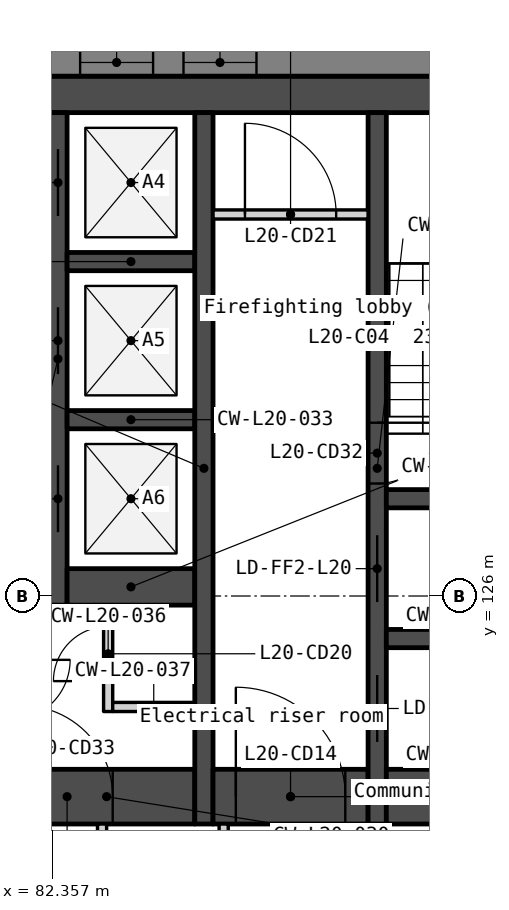
"""IFC4 building model, lengths in metres.
Left out: names, types, materials, properties, quantities, classifications, styles, units other than length and angle.
Written with IfcOpenShell. Run it as: python <this file> out.ifc"""

import sys

from ifc_helpers import new_model, si_unit, direction, frame, frame_2d, origin, place, context, subcontext, project, spatial, polyline, rectangle, outline, extrude, element, fill, save


model = new_model("IFC4")
c1 = context("Model", 3, precision=1e-05, world=origin(), true_north=direction((0.0, 1.0)))
c2 = subcontext(c1, "Body", "Model", "MODEL_VIEW")
j1 = project(units=[si_unit("LENGTHUNIT", "METRE"), si_unit("PLANEANGLEUNIT", "RADIAN")], contexts=[c1])
p1 = place(None, origin())
s1 = spatial("IfcSite", under=j1, at=p1, CompositionType="ELEMENT")
p2 = place(p1, origin())
s2 = spatial("IfcBuilding", under=s1, at=p2, CompositionType="ELEMENT")
p3 = place(p2, frame((0.0, 0.0, 85.3)))
s3 = spatial("IfcBuildingStorey", under=s2, at=p3, CompositionType="ELEMENT", Elevation=85.3)
p4 = place(p3, frame((66.0, 134.25, 0.0), z_axis=(0.0, 0.0, 1.0), x_axis=(1.0, 0.0, 0.0)))
e1 = element("IfcWall", 1, at=p4, inside=s3, PredefinedType="SOLIDWALL", context=c2, shape_type="SweptSolid", body=[
    extrude(rectangle(XDim=28.0, YDim=0.6, at=frame_2d((14.0, 0.0))), origin(), (0.0, 0.0, 1.0), 3.35),
])
p5 = place(p3, frame((81.8, 122.7, 0.0), z_axis=(0.0, 0.0, 1.0), x_axis=(1.0, 0.0, 0.0)))
e2 = element("IfcWall", 2, at=p5, inside=s3, PredefinedType="SOLIDWALL", context=c2, shape_type="SweptSolid", body=[
    extrude(rectangle(XDim=2.9, YDim=0.9, at=frame_2d((1.45, 0.0))), origin(), (0.0, 0.0, 1.0), 3.35),
])
p6 = place(p5, frame((0.05, 0.0, 0.0)))
e3 = element("IfcOpeningElement", 3, at=p6, cuts=e2, PredefinedType="OPENING", context=c2, shape_type="SweptSolid", body=[
    extrude(rectangle(XDim=1.5, YDim=2.1, at=frame_2d((0.75, 1.05))), frame((0.0, 0.46, 0.0), z_axis=(0.0, -1.0, 0.0), x_axis=(1.0, 0.0, 0.0)), (0.0, 0.0, 1.0), 0.92),
])
p7 = place(p3, frame((82.45, 133.95, 0.0), z_axis=(0.0, 0.0, 1.0), x_axis=(0.0, -1.0, 0.0)))
e4 = element("IfcWall", 4, at=p7, inside=s3, PredefinedType="SOLIDWALL", context=c2, shape_type="SweptSolid", body=[
    extrude(rectangle(XDim=8.1, YDim=0.3, at=frame_2d((4.05, 0.0))), origin(), (0.0, 0.0, 1.0), 3.35),
])
p8 = place(p7, frame((0.6, 0.0, 0.0)))
e5 = element("IfcOpeningElement", 5, at=p8, cuts=e4, PredefinedType="OPENING", context=c2, shape_type="SweptSolid", body=[
    extrude(rectangle(XDim=1.1, YDim=2.1, at=frame_2d((0.55, 1.05))), frame((0.0, 0.16, 0.0), z_axis=(0.0, -1.0, 0.0), x_axis=(1.0, 0.0, 0.0)), (0.0, 0.0, 1.0), 0.32),
])
p9 = place(p7, frame((3.2, 0.0, 0.0)))
e6 = element("IfcOpeningElement", 6, at=p9, cuts=e4, PredefinedType="OPENING", context=c2, shape_type="SweptSolid", body=[
    extrude(rectangle(XDim=1.1, YDim=2.1, at=frame_2d((0.55, 1.05))), frame((0.0, 0.16, 0.0), z_axis=(0.0, -1.0, 0.0), x_axis=(1.0, 0.0, 0.0)), (0.0, 0.0, 1.0), 0.32),
])
p10 = place(p7, frame((5.8, 0.0, 0.0)))
e7 = element("IfcOpeningElement", 7, at=p10, cuts=e4, PredefinedType="OPENING", context=c2, shape_type="SweptSolid", body=[
    extrude(rectangle(XDim=1.1, YDim=2.1, at=frame_2d((0.55, 1.05))), frame((0.0, 0.16, 0.0), z_axis=(0.0, -1.0, 0.0), x_axis=(1.0, 0.0, 0.0)), (0.0, 0.0, 1.0), 0.32),
])
for number, where, z_axis, x_axis in (
    (8, (82.6, 131.5, 0.0), (0.0, 0.0, 1.0), (1.0, 0.0, 0.0)),
    (9, (82.6, 128.9, 0.0), (0.0, 0.0, 1.0), (1.0, 0.0, 0.0)),
):
    element("IfcWall", number, at=place(p3, frame(where, z_axis=z_axis, x_axis=x_axis)), inside=s3, PredefinedType="SOLIDWALL", context=c2, shape_type="SweptSolid", body=[
        extrude(rectangle(XDim=2.1, YDim=0.3, at=frame_2d((1.05, 0.0))), origin(), (0.0, 0.0, 1.0), 3.35),
    ])
p11 = place(p3, frame((82.6, 126.15, 0.0), z_axis=(0.0, 0.0, 1.0), x_axis=(1.0, 0.0, 0.0)))
e10 = element("IfcWall", 10, at=p11, inside=s3, PredefinedType="SOLIDWALL", context=c2, shape_type="SweptSolid", body=[
    extrude(rectangle(XDim=2.1, YDim=0.6, at=frame_2d((1.05, 0.0))), origin(), (0.0, 0.0, 1.0), 3.35),
])
p12 = place(p3, frame((83.175, 122.25, 0.0), z_axis=(0.0, 0.0, 1.0), x_axis=(0.0, -1.0, 0.0)))
e11 = element("IfcWall", 11, at=p12, inside=s3, PredefinedType="PARTITIONING", context=c2, shape_type="SweptSolid", body=[
    extrude(rectangle(XDim=2.1, YDim=0.15, at=frame_2d((1.05, 0.0))), origin(), (0.0, 0.0, 1.0), 3.35),
])
p13 = place(p3, frame((83.275, 125.85, 0.0), z_axis=(0.0, 0.0, 1.0), x_axis=(0.0, -1.0, 0.0)))
e12 = element("IfcWall", 12, at=p13, inside=s3, PredefinedType="PARTITIONING", context=c2, shape_type="SweptSolid", body=[
    extrude(rectangle(XDim=1.75, YDim=0.15, at=frame_2d((0.875, 0.0))), origin(), (0.0, 0.0, 1.0), 3.35),
])
p14 = place(p13, frame((0.35, 0.0, 0.0)))
e13 = element("IfcOpeningElement", 13, at=p14, cuts=e12, PredefinedType="OPENING", context=c2, shape_type="SweptSolid", body=[
    extrude(rectangle(XDim=0.9, YDim=2.1, at=frame_2d((0.45, 1.05))), frame((0.0, 0.085, 0.0), z_axis=(0.0, -1.0, 0.0), x_axis=(1.0, 0.0, 0.0)), (0.0, 0.0, 1.0), 0.17),
])
p15 = place(p3, frame((83.35, 124.175, 0.0), z_axis=(0.0, 0.0, 1.0), x_axis=(1.0, 0.0, 0.0)))
e14 = element("IfcWall", 14, at=p15, inside=s3, PredefinedType="PARTITIONING", context=c2, shape_type="SweptSolid", body=[
    extrude(rectangle(XDim=1.35, YDim=0.15, at=frame_2d((0.675, 0.0))), origin(), (0.0, 0.0, 1.0), 3.35),
])
p16 = place(p3, frame((84.85, 133.95, 0.0), z_axis=(0.0, 0.0, 1.0), x_axis=(0.0, -1.0, 0.0)))
e15 = element("IfcWall", 15, at=p16, inside=s3, PredefinedType="SOLIDWALL", context=c2, shape_type="SweptSolid", body=[
    extrude(rectangle(XDim=11.7, YDim=0.3, at=frame_2d((5.85, 0.0))), origin(), (0.0, 0.0, 1.0), 3.35),
])
p17 = place(p3, frame((85.0, 132.275, 0.0), z_axis=(0.0, 0.0, 1.0), x_axis=(1.0, 0.0, 0.0)))
e16 = element("IfcWall", 16, at=p17, inside=s3, PredefinedType="PARTITIONING", context=c2, shape_type="SweptSolid", body=[
    extrude(rectangle(XDim=2.55, YDim=0.15, at=frame_2d((1.275, 0.0))), origin(), (0.0, 0.0, 1.0), 3.35),
])
p18 = place(p17, frame((0.525, 0.0, 0.0)))
e17 = element("IfcOpeningElement", 17, at=p18, cuts=e16, PredefinedType="OPENING", context=c2, shape_type="SweptSolid", body=[
    extrude(rectangle(XDim=1.5, YDim=2.1, at=frame_2d((0.75, 1.05))), frame((0.0, 0.085, 0.0), z_axis=(0.0, -1.0, 0.0), x_axis=(1.0, 0.0, 0.0)), (0.0, 0.0, 1.0), 0.17),
])
p19 = place(p3, frame((85.0, 122.7, 0.0), z_axis=(0.0, 0.0, 1.0), x_axis=(1.0, 0.0, 0.0)))
e18 = element("IfcWall", 18, at=p19, inside=s3, PredefinedType="SOLIDWALL", context=c2, shape_type="SweptSolid", body=[
    extrude(rectangle(XDim=2.55, YDim=0.9, at=frame_2d((1.275, 0.0))), origin(), (0.0, 0.0, 1.0), 3.35),
])
p20 = place(p19, frame((0.375, 0.0, 0.0)))
e19 = element("IfcOpeningElement", 19, at=p20, cuts=e18, PredefinedType="OPENING", context=c2, shape_type="SweptSolid", body=[
    extrude(rectangle(XDim=1.8, YDim=2.1, at=frame_2d((0.9, 1.05))), frame((0.0, 0.46, 0.0), z_axis=(0.0, -1.0, 0.0), x_axis=(1.0, 0.0, 0.0)), (0.0, 0.0, 1.0), 0.92),
])
p21 = place(p3, frame((85.175, 122.25, 0.0), z_axis=(0.0, 0.0, 1.0), x_axis=(0.0, -1.0, 0.0)))
e20 = element("IfcWall", 20, at=p21, inside=s3, PredefinedType="PARTITIONING", context=c2, shape_type="SweptSolid", body=[
    extrude(rectangle(XDim=2.1, YDim=0.15, at=frame_2d((1.05, 0.0))), origin(), (0.0, 0.0, 1.0), 3.35),
])
p22 = place(p21, frame((0.55, 0.0, 0.0)))
e21 = element("IfcOpeningElement", 21, at=p22, cuts=e20, PredefinedType="OPENING", context=c2, shape_type="SweptSolid", body=[
    extrude(rectangle(XDim=1.0, YDim=2.1, at=frame_2d((0.5, 1.05))), frame((0.0, 0.085, 0.0), z_axis=(0.0, -1.0, 0.0), x_axis=(1.0, 0.0, 0.0)), (0.0, 0.0, 1.0), 0.17),
])
p23 = place(p3, frame((87.375, 122.25, 0.0), z_axis=(0.0, 0.0, 1.0), x_axis=(0.0, -1.0, 0.0)))
e22 = element("IfcWall", 22, at=p23, inside=s3, PredefinedType="PARTITIONING", context=c2, shape_type="SweptSolid", body=[
    extrude(rectangle(XDim=2.1, YDim=0.15, at=frame_2d((1.05, 0.0))), origin(), (0.0, 0.0, 1.0), 3.35),
])
p24 = place(p3, frame((87.7, 133.95, 0.0), z_axis=(0.0, 0.0, 1.0), x_axis=(0.0, -1.0, 0.0)))
e23 = element("IfcWall", 23, at=p24, inside=s3, PredefinedType="SOLIDWALL", context=c2, shape_type="SweptSolid", body=[
    extrude(rectangle(XDim=11.7, YDim=0.3, at=frame_2d((5.85, 0.0))), origin(), (0.0, 0.0, 1.0), 3.35),
])
p25 = place(p24, frame((6.95, 0.0, 0.0)))
e24 = element("IfcOpeningElement", 24, at=p25, cuts=e23, PredefinedType="OPENING", context=c2, shape_type="SweptSolid", body=[
    extrude(rectangle(XDim=1.1, YDim=2.1, at=frame_2d((0.55, 1.05))), frame((0.0, 0.16, 0.0), z_axis=(0.0, -1.0, 0.0), x_axis=(1.0, 0.0, 0.0)), (0.0, 0.0, 1.0), 0.32),
])
p26 = place(p24, frame((5.1, 0.0, 0.0)))
e25 = element("IfcOpeningElement", 25, at=p26, cuts=e23, PredefinedType="OPENING", context=c2, shape_type="SweptSolid", body=[
    extrude(rectangle(XDim=1.0, YDim=2.1, at=frame_2d((0.5, 1.05))), frame((0.0, 0.16, 0.0), z_axis=(0.0, -1.0, 0.0), x_axis=(1.0, 0.0, 0.0)), (0.0, 0.0, 1.0), 0.32),
])
p27 = place(p24, frame((9.25, 0.0, 0.0)))
e26 = element("IfcOpeningElement", 26, at=p27, cuts=e23, PredefinedType="OPENING", context=c2, shape_type="SweptSolid", body=[
    extrude(rectangle(XDim=1.1, YDim=2.1, at=frame_2d((0.55, 1.05))), frame((0.0, 0.16, 0.0), z_axis=(0.0, -1.0, 0.0), x_axis=(1.0, 0.0, 0.0)), (0.0, 0.0, 1.0), 0.32),
])
for number, where, z_axis, x_axis in (
    (27, (87.85, 127.6, 0.0), (0.0, 0.0, 1.0), (1.0, 0.0, 0.0)),
    (28, (87.85, 125.3, 0.0), (0.0, 0.0, 1.0), (1.0, 0.0, 0.0)),
):
    element("IfcWall", number, at=place(p3, frame(where, z_axis=z_axis, x_axis=x_axis)), inside=s3, PredefinedType="SOLIDWALL", context=c2, shape_type="SweptSolid", body=[
        extrude(rectangle(XDim=2.55, YDim=0.3, at=frame_2d((1.275, 0.0))), origin(), (0.0, 0.0, 1.0), 3.35),
    ])
p28 = place(p3, frame((87.85, 122.7, 0.0), z_axis=(0.0, 0.0, 1.0), x_axis=(1.0, 0.0, 0.0)))
e29 = element("IfcWall", 29, at=p28, inside=s3, PredefinedType="SOLIDWALL", context=c2, shape_type="SweptSolid", body=[
    extrude(rectangle(XDim=2.55, YDim=0.9, at=frame_2d((1.275, 0.0))), origin(), (0.0, 0.0, 1.0), 3.35),
])
p29 = place(p3, frame((101.322, 134.775, -0.15), z_axis=(0.0, 0.0, 1.0), x_axis=(-1.0, 0.0, 0.0)))
e30 = element("IfcWall", 30, at=p29, inside=s3, PredefinedType="SOLIDWALL", context=c2, shape_type="SweptSolid", body=[
    extrude(outline(polyline([(42.643, 0.0), (42.643, 3.5), (0.0, 3.5), (0.0, 0.0), (42.643, 0.0)])), frame((0.0, 0.225, 0.0), z_axis=(0.0, -1.0, 0.0), x_axis=(1.0, 0.0, 0.0)), (0.0, 0.0, 1.0), 0.45),
])
p30 = place(p29, frame((7.079, 0.0, 1.05)))
e31 = element("IfcOpeningElement", 31, at=p30, cuts=e30, PredefinedType="OPENING", context=c2, shape_type="SweptSolid", body=[
    extrude(rectangle(XDim=1.2, YDim=1.5, at=frame_2d((0.6, 0.75))), frame((0.0, 0.235, 0.0), z_axis=(0.0, -1.0, 0.0), x_axis=(1.0, 0.0, 0.0)), (0.0, 0.0, 1.0), 0.47),
])
p31 = place(p29, frame((8.779, 0.0, 1.05)))
e32 = element("IfcOpeningElement", 32, at=p31, cuts=e30, PredefinedType="OPENING", context=c2, shape_type="SweptSolid", body=[
    extrude(rectangle(XDim=1.2, YDim=1.5, at=frame_2d((0.6, 0.75))), frame((0.0, 0.235, 0.0), z_axis=(0.0, -1.0, 0.0), x_axis=(1.0, 0.0, 0.0)), (0.0, 0.0, 1.0), 0.47),
])
p32 = place(p29, frame((15.607, 0.0, 1.05)))
e33 = element("IfcOpeningElement", 33, at=p32, cuts=e30, PredefinedType="OPENING", context=c2, shape_type="SweptSolid", body=[
    extrude(rectangle(XDim=1.2, YDim=1.5, at=frame_2d((0.6, 0.75))), frame((0.0, 0.235, 0.0), z_axis=(0.0, -1.0, 0.0), x_axis=(1.0, 0.0, 0.0)), (0.0, 0.0, 1.0), 0.47),
])
p33 = place(p29, frame((17.307, 0.0, 1.05)))
e34 = element("IfcOpeningElement", 34, at=p33, cuts=e30, PredefinedType="OPENING", context=c2, shape_type="SweptSolid", body=[
    extrude(rectangle(XDim=1.2, YDim=1.5, at=frame_2d((0.6, 0.75))), frame((0.0, 0.235, 0.0), z_axis=(0.0, -1.0, 0.0), x_axis=(1.0, 0.0, 0.0)), (0.0, 0.0, 1.0), 0.47),
])
p34 = place(p29, frame((24.136, 0.0, 1.05)))
e35 = element("IfcOpeningElement", 35, at=p34, cuts=e30, PredefinedType="OPENING", context=c2, shape_type="SweptSolid", body=[
    extrude(rectangle(XDim=1.2, YDim=1.5, at=frame_2d((0.6, 0.75))), frame((0.0, 0.235, 0.0), z_axis=(0.0, -1.0, 0.0), x_axis=(1.0, 0.0, 0.0)), (0.0, 0.0, 1.0), 0.47),
])
p35 = place(p29, frame((25.836, 0.0, 1.05)))
e36 = element("IfcOpeningElement", 36, at=p35, cuts=e30, PredefinedType="OPENING", context=c2, shape_type="SweptSolid", body=[
    extrude(rectangle(XDim=1.2, YDim=1.5, at=frame_2d((0.6, 0.75))), frame((0.0, 0.235, 0.0), z_axis=(0.0, -1.0, 0.0), x_axis=(1.0, 0.0, 0.0)), (0.0, 0.0, 1.0), 0.47),
])
p36 = place(p29, frame((32.665, 0.0, 1.05)))
e37 = element("IfcOpeningElement", 37, at=p36, cuts=e30, PredefinedType="OPENING", context=c2, shape_type="SweptSolid", body=[
    extrude(rectangle(XDim=1.2, YDim=1.5, at=frame_2d((0.6, 0.75))), frame((0.0, 0.235, 0.0), z_axis=(0.0, -1.0, 0.0), x_axis=(1.0, 0.0, 0.0)), (0.0, 0.0, 1.0), 0.47),
])
p37 = place(p29, frame((34.365, 0.0, 1.05)))
e38 = element("IfcOpeningElement", 38, at=p37, cuts=e30, PredefinedType="OPENING", context=c2, shape_type="SweptSolid", body=[
    extrude(rectangle(XDim=1.2, YDim=1.5, at=frame_2d((0.6, 0.75))), frame((0.0, 0.235, 0.0), z_axis=(0.0, -1.0, 0.0), x_axis=(1.0, 0.0, 0.0)), (0.0, 0.0, 1.0), 0.47),
])
p38 = place(p3, frame((82.605, 93.333, -0.15), z_axis=(0.0, 0.0, 1.0), x_axis=(0.500000478905, 0.866025127289, 0.0)))
e39 = element("IfcWall", 39, at=p38, inside=s3, PredefinedType="SOLIDWALL", context=c2, shape_type="SweptSolid", body=[
    extrude(outline(polyline([(42.643, 0.0), (42.643, 3.5), (0.0, 3.5), (0.0, 0.0), (42.643, 0.0)])), frame((0.0, 0.225, 0.0), z_axis=(0.0, -1.0, 0.0), x_axis=(1.0, 0.0, 0.0)), (0.0, 0.0, 1.0), 0.45),
])
p39 = place(p38, frame((7.079, 0.0, 1.05)))
e40 = element("IfcOpeningElement", 40, at=p39, cuts=e39, PredefinedType="OPENING", context=c2, shape_type="SweptSolid", body=[
    extrude(rectangle(XDim=1.2, YDim=1.5, at=frame_2d((0.6, 0.75))), frame((0.0, 0.235, 0.0), z_axis=(0.0, -1.0, 0.0), x_axis=(1.0, 0.0, 0.0)), (0.0, 0.0, 1.0), 0.47),
])
p40 = place(p38, frame((8.779, 0.0, 1.05)))
e41 = element("IfcOpeningElement", 41, at=p40, cuts=e39, PredefinedType="OPENING", context=c2, shape_type="SweptSolid", body=[
    extrude(rectangle(XDim=1.2, YDim=1.5, at=frame_2d((0.6, 0.75))), frame((0.0, 0.235, 0.0), z_axis=(0.0, -1.0, 0.0), x_axis=(1.0, 0.0, 0.0)), (0.0, 0.0, 1.0), 0.47),
])
p41 = place(p38, frame((15.607, 0.0, 1.05)))
e42 = element("IfcOpeningElement", 42, at=p41, cuts=e39, PredefinedType="OPENING", context=c2, shape_type="SweptSolid", body=[
    extrude(rectangle(XDim=1.2, YDim=1.5, at=frame_2d((0.6, 0.75))), frame((0.0, 0.235, 0.0), z_axis=(0.0, -1.0, 0.0), x_axis=(1.0, 0.0, 0.0)), (0.0, 0.0, 1.0), 0.47),
])
p42 = place(p38, frame((17.307, 0.0, 1.05)))
e43 = element("IfcOpeningElement", 43, at=p42, cuts=e39, PredefinedType="OPENING", context=c2, shape_type="SweptSolid", body=[
    extrude(rectangle(XDim=1.2, YDim=1.5, at=frame_2d((0.6, 0.75))), frame((0.0, 0.235, 0.0), z_axis=(0.0, -1.0, 0.0), x_axis=(1.0, 0.0, 0.0)), (0.0, 0.0, 1.0), 0.47),
])
p43 = place(p38, frame((24.136, 0.0, 1.05)))
e44 = element("IfcOpeningElement", 44, at=p43, cuts=e39, PredefinedType="OPENING", context=c2, shape_type="SweptSolid", body=[
    extrude(rectangle(XDim=1.2, YDim=1.5, at=frame_2d((0.6, 0.75))), frame((0.0, 0.235, 0.0), z_axis=(0.0, -1.0, 0.0), x_axis=(1.0, 0.0, 0.0)), (0.0, 0.0, 1.0), 0.47),
])
p44 = place(p38, frame((25.836, 0.0, 1.05)))
e45 = element("IfcOpeningElement", 45, at=p44, cuts=e39, PredefinedType="OPENING", context=c2, shape_type="SweptSolid", body=[
    extrude(rectangle(XDim=1.2, YDim=1.5, at=frame_2d((0.6, 0.75))), frame((0.0, 0.235, 0.0), z_axis=(0.0, -1.0, 0.0), x_axis=(1.0, 0.0, 0.0)), (0.0, 0.0, 1.0), 0.47),
])
p45 = place(p38, frame((32.665, 0.0, 1.05)))
e46 = element("IfcOpeningElement", 46, at=p45, cuts=e39, PredefinedType="OPENING", context=c2, shape_type="SweptSolid", body=[
    extrude(rectangle(XDim=1.2, YDim=1.5, at=frame_2d((0.6, 0.75))), frame((0.0, 0.235, 0.0), z_axis=(0.0, -1.0, 0.0), x_axis=(1.0, 0.0, 0.0)), (0.0, 0.0, 1.0), 0.47),
])
p46 = place(p38, frame((34.365, 0.0, 1.05)))
e47 = element("IfcOpeningElement", 47, at=p46, cuts=e39, PredefinedType="OPENING", context=c2, shape_type="SweptSolid", body=[
    extrude(rectangle(XDim=1.2, YDim=1.5, at=frame_2d((0.6, 0.75))), frame((0.0, 0.235, 0.0), z_axis=(0.0, -1.0, 0.0), x_axis=(1.0, 0.0, 0.0)), (0.0, 0.0, 1.0), 0.47),
])
p47 = place(p8, origin())
e48 = element("IfcDoor", 48, at=p47, inside=s3, OperationType="SLIDING_TO_LEFT", PredefinedType="DOOR", context=c2, shape_type="SweptSolid", body=[
    extrude(rectangle(XDim=1.1, YDim=2.1, at=frame_2d((0.55, 1.05))), frame((0.0, 0.025, 0.0), z_axis=(0.0, -1.0, 0.0), x_axis=(1.0, 0.0, 0.0)), (0.0, 0.0, 1.0), 0.05),
])
fill(e5, e48)
p48 = place(p9, origin())
e49 = element("IfcDoor", 49, at=p48, inside=s3, OperationType="SLIDING_TO_LEFT", PredefinedType="DOOR", context=c2, shape_type="SweptSolid", body=[
    extrude(rectangle(XDim=1.1, YDim=2.1, at=frame_2d((0.55, 1.05))), frame((0.0, 0.025, 0.0), z_axis=(0.0, -1.0, 0.0), x_axis=(1.0, 0.0, 0.0)), (0.0, 0.0, 1.0), 0.05),
])
fill(e6, e49)
p49 = place(p10, origin())
e50 = element("IfcDoor", 50, at=p49, inside=s3, OperationType="SLIDING_TO_LEFT", PredefinedType="DOOR", context=c2, shape_type="SweptSolid", body=[
    extrude(rectangle(XDim=1.1, YDim=2.1, at=frame_2d((0.55, 1.05))), frame((0.0, 0.025, 0.0), z_axis=(0.0, -1.0, 0.0), x_axis=(1.0, 0.0, 0.0)), (0.0, 0.0, 1.0), 0.05),
])
fill(e7, e50)
p50 = place(p25, origin())
e51 = element("IfcDoor", 51, at=p50, inside=s3, OperationType="SLIDING_TO_LEFT", PredefinedType="DOOR", context=c2, shape_type="SweptSolid", body=[
    extrude(rectangle(XDim=1.1, YDim=2.1, at=frame_2d((0.55, 1.05))), frame((0.0, 0.025, 0.0), z_axis=(0.0, -1.0, 0.0), x_axis=(1.0, 0.0, 0.0)), (0.0, 0.0, 1.0), 0.05),
])
fill(e24, e51)
p51 = place(p20, origin())
e52 = element("IfcDoor", 52, at=p51, inside=s3, OperationType="DOUBLE_DOOR_DOUBLE_SWING", PredefinedType="DOOR", context=c2, shape_type="SweptSolid", body=[
    extrude(rectangle(XDim=1.8, YDim=2.1, at=frame_2d((0.9, 1.05))), frame((0.0, 0.025, 0.0), z_axis=(0.0, -1.0, 0.0), x_axis=(1.0, 0.0, 0.0)), (0.0, 0.0, 1.0), 0.05),
])
fill(e19, e52)
p52 = place(p6, origin())
e53 = element("IfcDoor", 53, at=p52, inside=s3, OperationType="DOUBLE_DOOR_DOUBLE_SWING", PredefinedType="DOOR", context=c2, shape_type="SweptSolid", body=[
    extrude(rectangle(XDim=1.5, YDim=2.1, at=frame_2d((0.75, 1.05))), frame((0.0, 0.025, 0.0), z_axis=(0.0, -1.0, 0.0), x_axis=(1.0, 0.0, 0.0)), (0.0, 0.0, 1.0), 0.05),
])
fill(e3, e53)
p53 = place(p14, origin())
e54 = element("IfcDoor", 54, at=p53, inside=s3, OperationType="SINGLE_SWING_RIGHT", PredefinedType="DOOR", context=c2, shape_type="SweptSolid", body=[
    extrude(rectangle(XDim=0.9, YDim=2.1, at=frame_2d((0.45, 1.05))), frame((0.0, 0.025, 0.0), z_axis=(0.0, -1.0, 0.0), x_axis=(1.0, 0.0, 0.0)), (0.0, 0.0, 1.0), 0.05),
])
fill(e13, e54)
p54 = place(p18, origin())
e55 = element("IfcDoor", 55, at=p54, inside=s3, OperationType="DOUBLE_DOOR_DOUBLE_SWING", PredefinedType="DOOR", context=c2, shape_type="SweptSolid", body=[
    extrude(rectangle(XDim=1.5, YDim=2.1, at=frame_2d((0.75, 1.05))), frame((0.0, 0.025, 0.0), z_axis=(0.0, -1.0, 0.0), x_axis=(1.0, 0.0, 0.0)), (0.0, 0.0, 1.0), 0.05),
])
fill(e17, e55)
p55 = place(p26, origin())
e56 = element("IfcDoor", 56, at=p55, inside=s3, OperationType="SINGLE_SWING_LEFT", PredefinedType="DOOR", context=c2, shape_type="SweptSolid", body=[
    extrude(rectangle(XDim=1.0, YDim=2.1, at=frame_2d((0.5, 1.05))), frame((0.0, 0.025, 0.0), z_axis=(0.0, -1.0, 0.0), x_axis=(1.0, 0.0, 0.0)), (0.0, 0.0, 1.0), 0.05),
])
fill(e25, e56)
p56 = place(p27, origin())
e57 = element("IfcDoor", 57, at=p56, inside=s3, OperationType="SLIDING_TO_LEFT", PredefinedType="DOOR", context=c2, shape_type="SweptSolid", body=[
    extrude(rectangle(XDim=1.1, YDim=2.1, at=frame_2d((0.55, 1.05))), frame((0.0, 0.025, 0.0), z_axis=(0.0, -1.0, 0.0), x_axis=(1.0, 0.0, 0.0)), (0.0, 0.0, 1.0), 0.05),
])
fill(e26, e57)
p57 = place(p32, origin())
e58 = element("IfcWindow", 58, at=p57, inside=s3, PartitioningType="SINGLE_PANEL", PredefinedType="WINDOW", context=c2, shape_type="SweptSolid", body=[
    extrude(rectangle(XDim=1.2, YDim=1.5, at=frame_2d((0.6, 0.75))), frame((0.0, 0.03, 0.0), z_axis=(0.0, -1.0, 0.0), x_axis=(1.0, 0.0, 0.0)), (0.0, 0.0, 1.0), 0.06),
])
fill(e33, e58)
p58 = place(p33, origin())
e59 = element("IfcWindow", 59, at=p58, inside=s3, PartitioningType="SINGLE_PANEL", PredefinedType="WINDOW", context=c2, shape_type="SweptSolid", body=[
    extrude(rectangle(XDim=1.2, YDim=1.5, at=frame_2d((0.6, 0.75))), frame((0.0, 0.03, 0.0), z_axis=(0.0, -1.0, 0.0), x_axis=(1.0, 0.0, 0.0)), (0.0, 0.0, 1.0), 0.06),
])
fill(e34, e59)
save(model, sys.argv[1])
